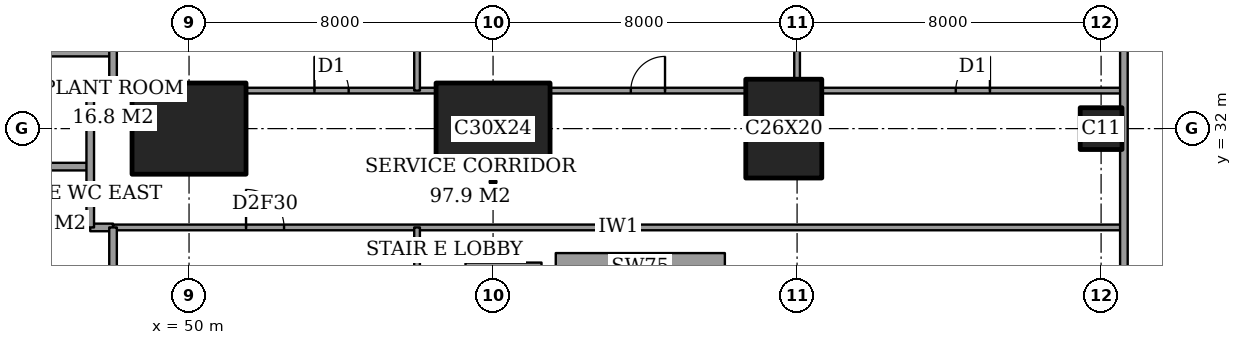
"""IFC4 building model, lengths in metres.
Left out: names, types, materials, properties, quantities, classifications, styles, units other than length and angle.
Written with IfcOpenShell. Run it as: python <this file> out.ifc"""

import sys

from ifc_helpers import new_model, si_unit, direction, frame, frame_2d, origin, origin_2d, place, context, subcontext, project, spatial, rectangle, extrude, element, fill, save


model = new_model("IFC4")
c1 = context("Model", 3, precision=1e-05, world=origin(), true_north=direction((0.0, 1.0)))
c2 = subcontext(c1, "Body", "Model", "MODEL_VIEW")
j1 = project(units=[si_unit("LENGTHUNIT", "METRE"), si_unit("PLANEANGLEUNIT", "RADIAN")], contexts=[c1])
p1 = place(None, origin())
s1 = spatial("IfcSite", under=j1, at=p1, CompositionType="ELEMENT")
p2 = place(p1, origin())
s2 = spatial("IfcBuilding", under=s1, at=p2, CompositionType="ELEMENT")
p3 = place(p2, frame((0.0, 0.0, 6.0)))
s3 = spatial("IfcBuildingStorey", under=s2, at=p3, CompositionType="ELEMENT", Elevation=6.0)
for number, where, z_axis, x_axis in (
    (1, (50.0, 32.0, 0.0), (0.0, 0.0, 1.0), (1.0, 0.0, 0.0)),
    (2, (58.0, 32.0, 0.0), (0.0, 0.0, 1.0), (1.0, 0.0, 0.0)),
):
    element("IfcColumn", number, at=place(p3, frame(where, z_axis=z_axis, x_axis=x_axis)), inside=s3, PredefinedType="COLUMN", context=c2, shape_type="SweptSolid", body=[
        extrude(rectangle(XDim=3.0, YDim=2.4, at=origin_2d()), origin(), (0.0, 0.0, 1.0), 5.0),
    ])
p4 = place(p3, frame((65.65, 32.0, 0.0), z_axis=(0.0, 0.0, 1.0), x_axis=(0.0, 1.0, 0.0)))
e3 = element("IfcColumn", 3, at=p4, inside=s3, PredefinedType="COLUMN", context=c2, shape_type="SweptSolid", body=[
    extrude(rectangle(XDim=2.6, YDim=2.0, at=origin_2d()), origin(), (0.0, 0.0, 1.0), 5.0),
])
p5 = place(p3, frame((74.0, 32.0, 0.0), z_axis=(0.0, 0.0, 1.0), x_axis=(1.0, 0.0, 0.0)))
e4 = element("IfcColumn", 4, at=p5, inside=s3, PredefinedType="COLUMN", context=c2, shape_type="SweptSolid", body=[
    extrude(rectangle(XDim=1.1, YDim=1.1, at=origin_2d()), origin(), (0.0, 0.0, 1.0), 5.0),
])
p6 = place(p3, frame((64.1, 28.35, 0.0), z_axis=(0.0, 0.0, 1.0), x_axis=(-1.0, 0.0, 0.0)))
e5 = element("IfcWall", 5, at=p6, inside=s3, PredefinedType="SHEAR", context=c2, shape_type="SweptSolid", body=[
    extrude(rectangle(XDim=4.45, YDim=0.75, at=frame_2d((2.225, 0.0))), origin(), (0.0, 0.0, 1.0), 5.0),
])
p7 = place(p3, frame((57.275, 28.375, 0.0), z_axis=(0.0, 0.0, 1.0), x_axis=(1.0, 0.0, 0.0)))
e6 = element("IfcWall", 6, at=p7, inside=s3, PredefinedType="PARTITIONING", context=c2, shape_type="SweptSolid", body=[
    extrude(rectangle(XDim=2.0, YDim=0.2, at=frame_2d((1.0, 0.0))), origin(), (0.0, 0.0, 1.0), 4.7),
])
p8 = place(p3, frame((47.4, 29.4, 0.0), z_axis=(0.0, 0.0, 1.0), x_axis=(1.0, 0.0, 0.0)))
e7 = element("IfcWall", 7, at=p8, inside=s3, PredefinedType="PARTITIONING", context=c2, shape_type="SweptSolid", body=[
    extrude(rectangle(XDim=0.6, YDim=0.2, at=frame_2d((0.3, 0.0))), origin(), (0.0, 0.0, 1.0), 4.7),
])
p9 = place(p3, frame((48.0, 29.4, 0.0), z_axis=(0.0, 0.0, 1.0), x_axis=(1.0, 0.0, 0.0)))
e8 = element("IfcWall", 8, at=p9, inside=s3, PredefinedType="PARTITIONING", context=c2, shape_type="SweptSolid", body=[
    extrude(rectangle(XDim=26.6, YDim=0.15, at=frame_2d((13.3, 0.0))), origin(), (0.0, 0.0, 1.0), 4.7),
])
p10 = place(p9, frame((3.5, 0.0, 0.0)))
e9 = element("IfcOpeningElement", 9, at=p10, cuts=e8, PredefinedType="OPENING", context=c2, shape_type="SweptSolid", body=[
    extrude(rectangle(XDim=1.0, YDim=2.1, at=frame_2d((0.5, 1.05))), frame((0.0, 0.085, 0.0), z_axis=(0.0, -1.0, 0.0), x_axis=(1.0, 0.0, 0.0)), (0.0, 0.0, 1.0), 0.17),
])
p11 = place(p3, frame((42.0, 31.0, 0.0), z_axis=(0.0, 0.0, 1.0), x_axis=(1.0, 0.0, 0.0)))
e10 = element("IfcWall", 10, at=p11, inside=s3, PredefinedType="PARTITIONING", context=c2, shape_type="SweptSolid", body=[
    extrude(rectangle(XDim=5.4, YDim=0.2, at=frame_2d((2.7, 0.0))), origin(), (0.0, 0.0, 1.0), 4.7),
])
p12 = place(p11, frame((2.2, 0.0, 0.0)))
e11 = element("IfcOpeningElement", 11, at=p12, cuts=e10, PredefinedType="OPENING", context=c2, shape_type="SweptSolid", body=[
    extrude(rectangle(XDim=1.0, YDim=2.1, at=frame_2d((0.5, 1.05))), frame((0.0, 0.11, 0.0), z_axis=(0.0, -1.0, 0.0), x_axis=(1.0, 0.0, 0.0)), (0.0, 0.0, 1.0), 0.22),
])
p13 = place(p3, frame((47.4, 33.0, 0.0), z_axis=(0.0, 0.0, 1.0), x_axis=(1.0, 0.0, 0.0)))
e12 = element("IfcWall", 12, at=p13, inside=s3, PredefinedType="PARTITIONING", context=c2, shape_type="SweptSolid", body=[
    extrude(rectangle(XDim=0.6, YDim=0.2, at=frame_2d((0.3, 0.0))), origin(), (0.0, 0.0, 1.0), 4.7),
])
p14 = place(p3, frame((48.0, 33.0, 0.0), z_axis=(0.0, 0.0, 1.0), x_axis=(1.0, 0.0, 0.0)))
e13 = element("IfcWall", 13, at=p14, inside=s3, PredefinedType="PARTITIONING", context=c2, shape_type="SweptSolid", body=[
    extrude(rectangle(XDim=0.5, YDim=0.15, at=frame_2d((0.25, 0.0))), origin(), (0.0, 0.0, 1.0), 4.7),
])
p15 = place(p3, frame((51.5, 33.0, 0.0), z_axis=(0.0, 0.0, 1.0), x_axis=(1.0, 0.0, 0.0)))
e14 = element("IfcWall", 14, at=p15, inside=s3, PredefinedType="PARTITIONING", context=c2, shape_type="SweptSolid", body=[
    extrude(rectangle(XDim=5.0, YDim=0.15, at=frame_2d((2.5, 0.0))), origin(), (0.0, 0.0, 1.0), 4.7),
])
p16 = place(p15, frame((1.8, 0.0, 0.0)))
e15 = element("IfcOpeningElement", 15, at=p16, cuts=e14, PredefinedType="OPENING", context=c2, shape_type="SweptSolid", body=[
    extrude(rectangle(XDim=0.9, YDim=2.1, at=frame_2d((0.45, 1.05))), frame((0.0, 0.085, 0.0), z_axis=(0.0, -1.0, 0.0), x_axis=(1.0, 0.0, 0.0)), (0.0, 0.0, 1.0), 0.17),
])
p17 = place(p3, frame((59.5, 33.0, 0.0), z_axis=(0.0, 0.0, 1.0), x_axis=(1.0, 0.0, 0.0)))
e16 = element("IfcWall", 16, at=p17, inside=s3, PredefinedType="PARTITIONING", context=c2, shape_type="SweptSolid", body=[
    extrude(rectangle(XDim=5.15, YDim=0.15, at=frame_2d((2.575, 0.0))), origin(), (0.0, 0.0, 1.0), 4.7),
])
p18 = place(p17, frame((2.125, 0.0, 0.0)))
e17 = element("IfcOpeningElement", 17, at=p18, cuts=e16, PredefinedType="OPENING", context=c2, shape_type="SweptSolid", body=[
    extrude(rectangle(XDim=0.9, YDim=2.1, at=frame_2d((0.45, 1.05))), frame((0.0, 0.085, 0.0), z_axis=(0.0, -1.0, 0.0), x_axis=(1.0, 0.0, 0.0)), (0.0, 0.0, 1.0), 0.17),
])
p19 = place(p3, frame((66.65, 33.0, 0.0), z_axis=(0.0, 0.0, 1.0), x_axis=(1.0, 0.0, 0.0)))
e18 = element("IfcWall", 18, at=p19, inside=s3, PredefinedType="PARTITIONING", context=c2, shape_type="SweptSolid", body=[
    extrude(rectangle(XDim=7.95, YDim=0.15, at=frame_2d((3.975, 0.0))), origin(), (0.0, 0.0, 1.0), 4.7),
])
p20 = place(p19, frame((3.525, 0.0, 0.0)))
e19 = element("IfcOpeningElement", 19, at=p20, cuts=e18, PredefinedType="OPENING", context=c2, shape_type="SweptSolid", body=[
    extrude(rectangle(XDim=0.9, YDim=2.1, at=frame_2d((0.45, 1.05))), frame((0.0, 0.085, 0.0), z_axis=(0.0, -1.0, 0.0), x_axis=(1.0, 0.0, 0.0)), (0.0, 0.0, 1.0), 0.17),
])
p21 = place(p3, frame((42.0, 34.0, 0.0), z_axis=(0.0, 0.0, 1.0), x_axis=(1.0, 0.0, 0.0)))
e20 = element("IfcWall", 20, at=p21, inside=s3, PredefinedType="PARTITIONING", context=c2, shape_type="SweptSolid", body=[
    extrude(rectangle(XDim=6.0, YDim=0.2, at=frame_2d((3.0, 0.0))), origin(), (0.0, 0.0, 1.0), 4.7),
])
p22 = place(p3, frame((47.4, 29.4, 0.0), z_axis=(0.0, 0.0, 1.0), x_axis=(0.0, 1.0, 0.0)))
e21 = element("IfcWall", 21, at=p22, inside=s3, PredefinedType="PARTITIONING", context=c2, shape_type="SweptSolid", body=[
    extrude(rectangle(XDim=3.6, YDim=0.2, at=frame_2d((1.8, 0.0))), origin(), (0.0, 0.0, 1.0), 4.7),
])
p23 = place(p3, frame((48.0, 28.0, 0.0), z_axis=(0.0, 0.0, 1.0), x_axis=(0.0, 1.0, 0.0)))
e22 = element("IfcWall", 22, at=p23, inside=s3, PredefinedType="PARTITIONING", context=c2, shape_type="SweptSolid", body=[
    extrude(rectangle(XDim=1.4, YDim=0.2, at=frame_2d((0.7, 0.0))), origin(), (0.0, 0.0, 1.0), 4.7),
])
p24 = place(p3, frame((48.0, 33.0, 0.0), z_axis=(0.0, 0.0, 1.0), x_axis=(0.0, 1.0, 0.0)))
e23 = element("IfcWall", 23, at=p24, inside=s3, PredefinedType="PARTITIONING", context=c2, shape_type="SweptSolid", body=[
    extrude(rectangle(XDim=23.561, YDim=0.2, at=frame_2d((11.781, 0.0))), origin(), (0.0, 0.0, 1.0), 4.7),
])
p25 = place(p3, frame((56.0, 14.0, 0.0), z_axis=(0.0, 0.0, 1.0), x_axis=(0.0, 1.0, 0.0)))
e24 = element("IfcWall", 24, at=p25, inside=s3, PredefinedType="PARTITIONING", context=c2, shape_type="SweptSolid", body=[
    extrude(rectangle(XDim=15.4, YDim=0.15, at=frame_2d((7.7, 0.0))), origin(), (0.0, 0.0, 1.0), 4.7),
])
p26 = place(p25, frame((6.8, 0.0, 0.0)))
e25 = element("IfcOpeningElement", 25, at=p26, cuts=e24, PredefinedType="OPENING", context=c2, shape_type="SweptSolid", body=[
    extrude(rectangle(XDim=1.8, YDim=2.1, at=frame_2d((0.9, 1.05))), frame((0.0, 0.085, 0.0), z_axis=(0.0, -1.0, 0.0), x_axis=(1.0, 0.0, 0.0)), (0.0, 0.0, 1.0), 0.17),
])
p27 = place(p3, frame((56.0, 33.0, 0.0), z_axis=(0.0, 0.0, 1.0), x_axis=(0.0, 1.0, 0.0)))
e26 = element("IfcWall", 26, at=p27, inside=s3, PredefinedType="PARTITIONING", context=c2, shape_type="SweptSolid", body=[
    extrude(rectangle(XDim=23.561, YDim=0.15, at=frame_2d((11.781, 0.0))), origin(), (0.0, 0.0, 1.0), 4.7),
])
p28 = place(p3, frame((66.0, 33.0, 0.0), z_axis=(0.0, 0.0, 1.0), x_axis=(0.0, 1.0, 0.0)))
e27 = element("IfcWall", 27, at=p28, inside=s3, PredefinedType="PARTITIONING", context=c2, shape_type="SweptSolid", body=[
    extrude(rectangle(XDim=5.9, YDim=0.15, at=frame_2d((2.95, 0.0))), origin(), (0.0, 0.0, 1.0), 3.3),
])
p29 = place(p3, frame((74.6, 14.0, 0.0), z_axis=(0.0, 0.0, 1.0), x_axis=(0.0, 1.0, 0.0)))
e28 = element("IfcWall", 28, at=p29, inside=s3, PredefinedType="PARTITIONING", context=c2, shape_type="SweptSolid", body=[
    extrude(rectangle(XDim=42.45, YDim=0.2, at=frame_2d((21.225, 0.0))), origin(), (0.0, 0.0, 1.0), 4.7),
])
p30 = place(p10, origin())
e29 = element("IfcDoor", 29, at=p30, inside=s3, OperationType="SINGLE_SWING_RIGHT", PredefinedType="DOOR", context=c2, shape_type="SweptSolid", body=[
    extrude(rectangle(XDim=1.0, YDim=2.1, at=frame_2d((0.5, 1.05))), frame((0.0, 0.025, 0.0), z_axis=(0.0, -1.0, 0.0), x_axis=(1.0, 0.0, 0.0)), (0.0, 0.0, 1.0), 0.05),
])
fill(e9, e29)
p31 = place(p16, origin())
e30 = element("IfcDoor", 30, at=p31, inside=s3, OperationType="SINGLE_SWING_RIGHT", PredefinedType="DOOR", context=c2, shape_type="SweptSolid", body=[
    extrude(rectangle(XDim=0.9, YDim=2.1, at=frame_2d((0.45, 1.05))), frame((0.0, 0.025, 0.0), z_axis=(0.0, -1.0, 0.0), x_axis=(1.0, 0.0, 0.0)), (0.0, 0.0, 1.0), 0.05),
])
fill(e15, e30)
p32 = place(p18, origin())
e31 = element("IfcDoor", 31, at=p32, inside=s3, OperationType="SINGLE_SWING_LEFT", PredefinedType="DOOR", context=c2, shape_type="SweptSolid", body=[
    extrude(rectangle(XDim=0.9, YDim=2.1, at=frame_2d((0.45, 1.05))), frame((0.0, 0.025, 0.0), z_axis=(0.0, -1.0, 0.0), x_axis=(1.0, 0.0, 0.0)), (0.0, 0.0, 1.0), 0.05),
])
fill(e17, e31)
p33 = place(p20, origin())
e32 = element("IfcDoor", 32, at=p33, inside=s3, OperationType="SINGLE_SWING_LEFT", PredefinedType="DOOR", context=c2, shape_type="SweptSolid", body=[
    extrude(rectangle(XDim=0.9, YDim=2.1, at=frame_2d((0.45, 1.05))), frame((0.0, 0.025, 0.0), z_axis=(0.0, -1.0, 0.0), x_axis=(1.0, 0.0, 0.0)), (0.0, 0.0, 1.0), 0.05),
])
fill(e19, e32)
save(model, sys.argv[1])
